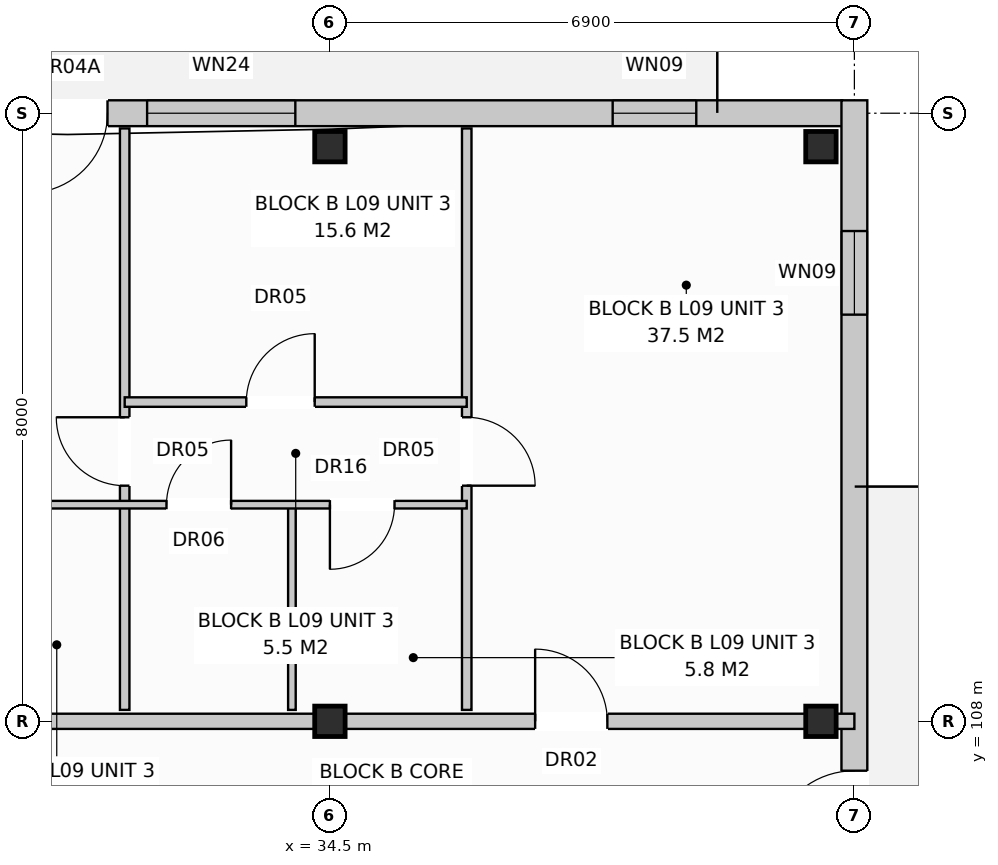
"""IFC4 building model, lengths in metres.
Left out: names, types, materials, properties, quantities, classifications, styles, units other than length and angle.
Written with IfcOpenShell. Run it as: python <this file> out.ifc"""

import sys

from ifc_helpers import new_model, si_unit, direction, frame, frame_2d, origin, origin_with_axes, origin_2d, place, context, subcontext, project, spatial, rectangle, extrude, element, fill, save


model = new_model("IFC4")
c1 = context("Model", 3, precision=1e-05, world=origin(), true_north=direction((0.0, 1.0)))
c2 = subcontext(c1, "Body", "Model", "MODEL_VIEW")
j1 = project(units=[si_unit("LENGTHUNIT", "METRE"), si_unit("PLANEANGLEUNIT", "RADIAN")], contexts=[c1])
p1 = place(None, origin())
s1 = spatial("IfcSite", under=j1, at=p1, CompositionType="ELEMENT")
p2 = place(p1, origin())
s2 = spatial("IfcBuilding", under=s1, at=p2, CompositionType="ELEMENT")
p3 = place(p2, frame((0.0, 0.0, 30.4)))
s3 = spatial("IfcBuildingStorey", under=s2, at=p3, CompositionType="ELEMENT", Elevation=30.4)
for number, where, z_axis, x_axis in (
    (1, (34.5, 108.0, 0.0), (0.0, 0.0, 1.0), (1.0, 0.0, 0.0)),
    (2, (34.5, 115.56, 0.0), (0.0, 0.0, 1.0), (1.0, 0.0, 0.0)),
    (3, (40.96, 108.0, 0.0), (0.0, 0.0, 1.0), (1.0, 0.0, 0.0)),
    (4, (40.96, 115.56, 0.0), (0.0, 0.0, 1.0), (1.0, 0.0, 0.0)),
):
    element("IfcColumn", number, at=place(p3, frame(where, z_axis=z_axis, x_axis=x_axis)), inside=s3, PredefinedType="COLUMN", context=c2, shape_type="SweptSolid", body=[
        extrude(rectangle(XDim=0.4, YDim=0.4, at=origin_2d()), origin(), (0.0, 0.0, 1.0), 3.2),
    ])
p4 = place(p3, frame((0.16, 116.0, 0.0), z_axis=(0.0, 0.0, 1.0), x_axis=(1.0, 0.0, 0.0)))
e5 = element("IfcWall", 5, at=p4, inside=s3, PredefinedType="STANDARD", context=c2, shape_type="SweptSolid", body=[
    extrude(rectangle(XDim=41.08, YDim=0.34, at=frame_2d((20.54, 0.0))), origin(), (0.0, 0.0, 1.0), 2.96),
])
p5 = place(p4, frame((4.864, 0.0, 0.0)))
e6 = element("IfcOpeningElement", 6, at=p5, cuts=e5, PredefinedType="OPENING", context=c2, shape_type="SweptSolid", body=[
    extrude(rectangle(XDim=1.05, YDim=2.12, at=frame_2d((0.525, 1.06))), frame((0.0, 0.182, 0.0), z_axis=(0.0, -1.0, 0.0), x_axis=(1.0, 0.0, 0.0)), (0.0, 0.0, 1.0), 0.364),
])
p6 = place(p4, frame((18.86, 0.0, 0.0)))
e7 = element("IfcOpeningElement", 7, at=p6, cuts=e5, PredefinedType="OPENING", context=c2, shape_type="SweptSolid", body=[
    extrude(rectangle(XDim=1.05, YDim=2.12, at=frame_2d((0.525, 1.06))), frame((0.0, 0.182, 0.0), z_axis=(0.0, -1.0, 0.0), x_axis=(1.0, 0.0, 0.0)), (0.0, 0.0, 1.0), 0.364),
])
p7 = place(p4, frame((30.364, 0.0, 0.0)))
e8 = element("IfcOpeningElement", 8, at=p7, cuts=e5, PredefinedType="OPENING", context=c2, shape_type="SweptSolid", body=[
    extrude(rectangle(XDim=1.05, YDim=2.12, at=frame_2d((0.525, 1.06))), frame((0.0, 0.182, 0.0), z_axis=(0.0, -1.0, 0.0), x_axis=(1.0, 0.0, 0.0)), (0.0, 0.0, 1.0), 0.364),
])
p8 = place(p4, frame((2.46, 0.0, 0.72)))
e9 = element("IfcOpeningElement", 9, at=p8, cuts=e5, PredefinedType="OPENING", context=c2, shape_type="SweptSolid", body=[
    extrude(rectangle(XDim=1.1, YDim=1.5, at=frame_2d((0.55, 0.75))), frame((0.0, 0.182, 0.0), z_axis=(0.0, -1.0, 0.0), x_axis=(1.0, 0.0, 0.0)), (0.0, 0.0, 1.0), 0.364),
])
p9 = place(p4, frame((7.735, 0.0, 0.8)))
e10 = element("IfcOpeningElement", 10, at=p9, cuts=e5, PredefinedType="OPENING", context=c2, shape_type="SweptSolid", body=[
    extrude(rectangle(XDim=1.95, YDim=1.65, at=frame_2d((0.975, 0.825))), frame((0.0, 0.182, 0.0), z_axis=(0.0, -1.0, 0.0), x_axis=(1.0, 0.0, 0.0)), (0.0, 0.0, 1.0), 0.364),
])
p10 = place(p4, frame((14.56, 0.0, 0.72)))
e11 = element("IfcOpeningElement", 11, at=p10, cuts=e5, PredefinedType="OPENING", context=c2, shape_type="SweptSolid", body=[
    extrude(rectangle(XDim=1.1, YDim=1.5, at=frame_2d((0.55, 0.75))), frame((0.0, 0.182, 0.0), z_axis=(0.0, -1.0, 0.0), x_axis=(1.0, 0.0, 0.0)), (0.0, 0.0, 1.0), 0.364),
])
p11 = place(p4, frame((16.81, 0.0, 0.8)))
e12 = element("IfcOpeningElement", 12, at=p11, cuts=e5, PredefinedType="OPENING", context=c2, shape_type="SweptSolid", body=[
    extrude(rectangle(XDim=1.8, YDim=1.7, at=frame_2d((0.9, 0.85))), frame((0.0, 0.182, 0.0), z_axis=(0.0, -1.0, 0.0), x_axis=(1.0, 0.0, 0.0)), (0.0, 0.0, 1.0), 0.364),
])
p12 = place(p4, frame((21.535, 0.0, 0.8)))
e13 = element("IfcOpeningElement", 13, at=p12, cuts=e5, PredefinedType="OPENING", context=c2, shape_type="SweptSolid", body=[
    extrude(rectangle(XDim=1.95, YDim=1.65, at=frame_2d((0.975, 0.825))), frame((0.0, 0.182, 0.0), z_axis=(0.0, -1.0, 0.0), x_axis=(1.0, 0.0, 0.0)), (0.0, 0.0, 1.0), 0.364),
])
p13 = place(p4, frame((25.36, 0.0, 0.72)))
e14 = element("IfcOpeningElement", 14, at=p13, cuts=e5, PredefinedType="OPENING", context=c2, shape_type="SweptSolid", body=[
    extrude(rectangle(XDim=1.1, YDim=1.5, at=frame_2d((0.55, 0.75))), frame((0.0, 0.182, 0.0), z_axis=(0.0, -1.0, 0.0), x_axis=(1.0, 0.0, 0.0)), (0.0, 0.0, 1.0), 0.364),
])
p14 = place(p4, frame((28.66, 0.0, 0.72)))
e15 = element("IfcOpeningElement", 15, at=p14, cuts=e5, PredefinedType="OPENING", context=c2, shape_type="SweptSolid", body=[
    extrude(rectangle(XDim=1.1, YDim=1.5, at=frame_2d((0.55, 0.75))), frame((0.0, 0.182, 0.0), z_axis=(0.0, -1.0, 0.0), x_axis=(1.0, 0.0, 0.0)), (0.0, 0.0, 1.0), 0.364),
])
p15 = place(p4, frame((31.935, 0.0, 0.8)))
e16 = element("IfcOpeningElement", 16, at=p15, cuts=e5, PredefinedType="OPENING", context=c2, shape_type="SweptSolid", body=[
    extrude(rectangle(XDim=1.95, YDim=1.65, at=frame_2d((0.975, 0.825))), frame((0.0, 0.182, 0.0), z_axis=(0.0, -1.0, 0.0), x_axis=(1.0, 0.0, 0.0)), (0.0, 0.0, 1.0), 0.364),
])
p16 = place(p4, frame((38.06, 0.0, 0.72)))
e17 = element("IfcOpeningElement", 17, at=p16, cuts=e5, PredefinedType="OPENING", context=c2, shape_type="SweptSolid", body=[
    extrude(rectangle(XDim=1.1, YDim=1.5, at=frame_2d((0.55, 0.75))), frame((0.0, 0.182, 0.0), z_axis=(0.0, -1.0, 0.0), x_axis=(1.0, 0.0, 0.0)), (0.0, 0.0, 1.0), 0.364),
])
p17 = place(p3, frame((41.4, 97.43, 0.0), z_axis=(0.0, 0.0, 1.0), x_axis=(0.0, 1.0, 0.0)))
e18 = element("IfcWall", 18, at=p17, inside=s3, PredefinedType="STANDARD", context=c2, shape_type="SweptSolid", body=[
    extrude(rectangle(XDim=18.74, YDim=0.34, at=frame_2d((9.37, 0.0))), origin(), (0.0, 0.0, 1.0), 2.96),
])
p18 = place(p17, frame((8.82, 0.0, 0.0)))
e19 = element("IfcOpeningElement", 19, at=p18, cuts=e18, PredefinedType="OPENING", context=c2, shape_type="SweptSolid", body=[
    extrude(rectangle(XDim=1.1, YDim=2.1, at=frame_2d((0.55, 1.05))), frame((0.0, 0.182, 0.0), z_axis=(0.0, -1.0, 0.0), x_axis=(1.0, 0.0, 0.0)), (0.0, 0.0, 1.0), 0.364),
])
p19 = place(p17, frame((1.72, 0.0, 0.72)))
e20 = element("IfcOpeningElement", 20, at=p19, cuts=e18, PredefinedType="OPENING", context=c2, shape_type="SweptSolid", body=[
    extrude(rectangle(XDim=1.1, YDim=1.5, at=frame_2d((0.55, 0.75))), frame((0.0, 0.182, 0.0), z_axis=(0.0, -1.0, 0.0), x_axis=(1.0, 0.0, 0.0)), (0.0, 0.0, 1.0), 0.364),
])
p20 = place(p17, frame((15.92, 0.0, 0.72)))
e21 = element("IfcOpeningElement", 21, at=p20, cuts=e18, PredefinedType="OPENING", context=c2, shape_type="SweptSolid", body=[
    extrude(rectangle(XDim=1.1, YDim=1.5, at=frame_2d((0.55, 0.75))), frame((0.0, 0.182, 0.0), z_axis=(0.0, -1.0, 0.0), x_axis=(1.0, 0.0, 0.0)), (0.0, 0.0, 1.0), 0.364),
])
p21 = place(p3, frame((27.6, 108.0, 0.0), z_axis=(0.0, 0.0, 1.0), x_axis=(1.0, 0.0, 0.0)))
e22 = element("IfcWall", 22, at=p21, inside=s3, PredefinedType="PARTITIONING", context=c2, shape_type="SweptSolid", body=[
    extrude(rectangle(XDim=13.8, YDim=0.2, at=frame_2d((6.9, 0.0))), origin(), (0.0, 0.0, 1.0), 2.4),
])
p22 = place(p21, frame((9.6, 0.0, 0.0)))
e23 = element("IfcOpeningElement", 23, at=p22, cuts=e22, PredefinedType="OPENING", context=c2, shape_type="SweptSolid", body=[
    extrude(rectangle(XDim=0.95, YDim=2.15, at=frame_2d((0.475, 1.075))), frame((0.0, 0.112, 0.0), z_axis=(0.0, -1.0, 0.0), x_axis=(1.0, 0.0, 0.0)), (0.0, 0.0, 1.0), 0.224),
])
p23 = place(p3, frame((36.3, 108.15, 0.0), z_axis=(0.0, 0.0, 1.0), x_axis=(0.0, 1.0, 0.0)))
e24 = element("IfcWall", 24, at=p23, inside=s3, PredefinedType="PARTITIONING", context=c2, shape_type="SweptSolid", body=[
    extrude(rectangle(XDim=7.65, YDim=0.125, at=frame_2d((3.825, 0.0))), origin(), (0.0, 0.0, 1.0), 2.96),
])
p24 = place(p23, frame((2.95, 0.0, 0.0)))
e25 = element("IfcOpeningElement", 25, at=p24, cuts=e24, PredefinedType="OPENING", context=c2, shape_type="SweptSolid", body=[
    extrude(rectangle(XDim=0.9, YDim=2.1, at=frame_2d((0.45, 1.05))), frame((0.0, 0.074, 0.0), z_axis=(0.0, -1.0, 0.0), x_axis=(1.0, 0.0, 0.0)), (0.0, 0.0, 1.0), 0.149),
])
p25 = place(p3, frame((31.8, 108.15, 0.0), z_axis=(0.0, 0.0, 1.0), x_axis=(0.0, 1.0, 0.0)))
e26 = element("IfcWall", 26, at=p25, inside=s3, PredefinedType="PARTITIONING", context=c2, shape_type="SweptSolid", body=[
    extrude(rectangle(XDim=7.65, YDim=0.125, at=frame_2d((3.825, 0.0))), origin(), (0.0, 0.0, 1.0), 2.96),
])
p26 = place(p25, frame((2.95, 0.0, 0.0)))
e27 = element("IfcOpeningElement", 27, at=p26, cuts=e26, PredefinedType="OPENING", context=c2, shape_type="SweptSolid", body=[
    extrude(rectangle(XDim=0.9, YDim=2.1, at=frame_2d((0.45, 1.05))), frame((0.0, 0.074, 0.0), z_axis=(0.0, -1.0, 0.0), x_axis=(1.0, 0.0, 0.0)), (0.0, 0.0, 1.0), 0.149),
])
p27 = place(p3, frame((34.0, 108.15, 0.0), z_axis=(0.0, 0.0, 1.0), x_axis=(0.0, 1.0, 0.0)))
e28 = element("IfcWall", 28, at=p27, inside=s3, PredefinedType="PARTITIONING", context=c2, shape_type="SweptSolid", body=[
    extrude(rectangle(XDim=2.7, YDim=0.1, at=frame_2d((1.35, 0.0))), origin(), (0.0, 0.0, 1.0), 2.96),
])
p28 = place(p3, frame((27.7, 110.85, 0.0), z_axis=(0.0, 0.0, 1.0), x_axis=(1.0, 0.0, 0.0)))
e29 = element("IfcWall", 29, at=p28, inside=s3, PredefinedType="PARTITIONING", context=c2, shape_type="SweptSolid", body=[
    extrude(rectangle(XDim=8.6, YDim=0.1, at=frame_2d((4.3, 0.0))), origin(), (0.0, 0.0, 1.0), 2.96),
])
p29 = place(p28, frame((1.4, 0.0, 0.0)))
e30 = element("IfcOpeningElement", 30, at=p29, cuts=e29, PredefinedType="OPENING", context=c2, shape_type="SweptSolid", body=[
    extrude(rectangle(XDim=0.85, YDim=2.05, at=frame_2d((0.425, 1.025))), frame((0.0, 0.062, 0.0), z_axis=(0.0, -1.0, 0.0), x_axis=(1.0, 0.0, 0.0)), (0.0, 0.0, 1.0), 0.124),
])
p30 = place(p28, frame((4.65, 0.0, 0.0)))
e31 = element("IfcOpeningElement", 31, at=p30, cuts=e29, PredefinedType="OPENING", context=c2, shape_type="SweptSolid", body=[
    extrude(rectangle(XDim=0.85, YDim=2.05, at=frame_2d((0.425, 1.025))), frame((0.0, 0.062, 0.0), z_axis=(0.0, -1.0, 0.0), x_axis=(1.0, 0.0, 0.0)), (0.0, 0.0, 1.0), 0.124),
])
p31 = place(p28, frame((6.8, 0.0, 0.0)))
e32 = element("IfcOpeningElement", 32, at=p31, cuts=e29, PredefinedType="OPENING", context=c2, shape_type="SweptSolid", body=[
    extrude(rectangle(XDim=0.85, YDim=2.1, at=frame_2d((0.425, 1.05))), frame((0.0, 0.062, 0.0), z_axis=(0.0, -1.0, 0.0), x_axis=(1.0, 0.0, 0.0)), (0.0, 0.0, 1.0), 0.124),
])
p32 = place(p3, frame((31.8, 112.2, 0.0), z_axis=(0.0, 0.0, 1.0), x_axis=(1.0, 0.0, 0.0)))
e33 = element("IfcWall", 33, at=p32, inside=s3, PredefinedType="PARTITIONING", context=c2, shape_type="SweptSolid", body=[
    extrude(rectangle(XDim=4.5, YDim=0.125, at=frame_2d((2.25, 0.0))), origin(), (0.0, 0.0, 1.0), 2.96),
])
p33 = place(p32, frame((1.6, 0.0, 0.0)))
e34 = element("IfcOpeningElement", 34, at=p33, cuts=e33, PredefinedType="OPENING", context=c2, shape_type="SweptSolid", body=[
    extrude(rectangle(XDim=0.9, YDim=2.1, at=frame_2d((0.45, 1.05))), frame((0.0, 0.074, 0.0), z_axis=(0.0, -1.0, 0.0), x_axis=(1.0, 0.0, 0.0)), (0.0, 0.0, 1.0), 0.149),
])
p34 = place(p7, frame((1.05, 0.0, 0.0), z_axis=(0.0, 0.0, 1.0), x_axis=(-1.0, 0.0, 0.0)))
e35 = element("IfcDoor", 35, at=p34, inside=s3, OperationType="SINGLE_SWING_LEFT", PredefinedType="DOOR", context=c2, shape_type="SweptSolid", body=[
    extrude(rectangle(XDim=1.05, YDim=2.12, at=frame_2d((0.525, 1.06))), frame((0.0, 0.025, 0.0), z_axis=(0.0, -1.0, 0.0), x_axis=(1.0, 0.0, 0.0)), (0.0, 0.0, 1.0), 0.05),
])
fill(e8, e35)
p35 = place(p15, origin_with_axes())
e36 = element("IfcWindow", 36, at=p35, inside=s3, PartitioningType="SINGLE_PANEL", PredefinedType="WINDOW", context=c2, shape_type="SweptSolid", body=[
    extrude(rectangle(XDim=1.95, YDim=1.65, at=frame_2d((0.975, 0.825))), frame((0.0, 0.03, 0.0), z_axis=(0.0, -1.0, 0.0), x_axis=(1.0, 0.0, 0.0)), (0.0, 0.0, 1.0), 0.06),
])
fill(e16, e36)
p36 = place(p16, origin_with_axes())
e37 = element("IfcWindow", 37, at=p36, inside=s3, PartitioningType="SINGLE_PANEL", PredefinedType="WINDOW", context=c2, shape_type="SweptSolid", body=[
    extrude(rectangle(XDim=1.1, YDim=1.5, at=frame_2d((0.55, 0.75))), frame((0.0, 0.03, 0.0), z_axis=(0.0, -1.0, 0.0), x_axis=(1.0, 0.0, 0.0)), (0.0, 0.0, 1.0), 0.06),
])
fill(e17, e37)
p37 = place(p18, origin_with_axes())
e38 = element("IfcDoor", 38, at=p37, inside=s3, OperationType="SINGLE_SWING_LEFT", PredefinedType="DOOR", context=c2, shape_type="SweptSolid", body=[
    extrude(rectangle(XDim=1.1, YDim=2.1, at=frame_2d((0.55, 1.05))), frame((0.0, 0.025, 0.0), z_axis=(0.0, -1.0, 0.0), x_axis=(1.0, 0.0, 0.0)), (0.0, 0.0, 1.0), 0.05),
])
fill(e19, e38)
p38 = place(p20, origin_with_axes())
e39 = element("IfcWindow", 39, at=p38, inside=s3, PartitioningType="SINGLE_PANEL", PredefinedType="WINDOW", context=c2, shape_type="SweptSolid", body=[
    extrude(rectangle(XDim=1.1, YDim=1.5, at=frame_2d((0.55, 0.75))), frame((0.0, 0.03, 0.0), z_axis=(0.0, -1.0, 0.0), x_axis=(1.0, 0.0, 0.0)), (0.0, 0.0, 1.0), 0.06),
])
fill(e21, e39)
p39 = place(p22, origin_with_axes())
e40 = element("IfcDoor", 40, at=p39, inside=s3, OperationType="SINGLE_SWING_LEFT", PredefinedType="DOOR", context=c2, shape_type="SweptSolid", body=[
    extrude(rectangle(XDim=0.95, YDim=2.15, at=frame_2d((0.475, 1.075))), frame((0.0, 0.025, 0.0), z_axis=(0.0, -1.0, 0.0), x_axis=(1.0, 0.0, 0.0)), (0.0, 0.0, 1.0), 0.05),
])
fill(e23, e40)
p40 = place(p24, frame((0.9, 0.0, 0.0), z_axis=(0.0, 0.0, 1.0), x_axis=(-1.0, 0.0, 0.0)))
e41 = element("IfcDoor", 41, at=p40, inside=s3, OperationType="SINGLE_SWING_LEFT", PredefinedType="DOOR", context=c2, shape_type="SweptSolid", body=[
    extrude(rectangle(XDim=0.9, YDim=2.1, at=frame_2d((0.45, 1.05))), frame((0.0, 0.025, 0.0), z_axis=(0.0, -1.0, 0.0), x_axis=(1.0, 0.0, 0.0)), (0.0, 0.0, 1.0), 0.05),
])
fill(e25, e41)
p41 = place(p26, origin_with_axes())
e42 = element("IfcDoor", 42, at=p41, inside=s3, OperationType="SINGLE_SWING_RIGHT", PredefinedType="DOOR", context=c2, shape_type="SweptSolid", body=[
    extrude(rectangle(XDim=0.9, YDim=2.1, at=frame_2d((0.45, 1.05))), frame((0.0, 0.025, 0.0), z_axis=(0.0, -1.0, 0.0), x_axis=(1.0, 0.0, 0.0)), (0.0, 0.0, 1.0), 0.05),
])
fill(e27, e42)
p42 = place(p30, origin_with_axes())
e43 = element("IfcDoor", 43, at=p42, inside=s3, OperationType="SINGLE_SWING_RIGHT", PredefinedType="DOOR", context=c2, shape_type="SweptSolid", body=[
    extrude(rectangle(XDim=0.85, YDim=2.05, at=frame_2d((0.425, 1.025))), frame((0.0, 0.025, 0.0), z_axis=(0.0, -1.0, 0.0), x_axis=(1.0, 0.0, 0.0)), (0.0, 0.0, 1.0), 0.05),
])
fill(e31, e43)
p43 = place(p31, frame((0.85, 0.0, 0.0), z_axis=(0.0, 0.0, 1.0), x_axis=(-1.0, 0.0, 0.0)))
e44 = element("IfcDoor", 44, at=p43, inside=s3, OperationType="SINGLE_SWING_LEFT", PredefinedType="DOOR", context=c2, shape_type="SweptSolid", body=[
    extrude(rectangle(XDim=0.85, YDim=2.1, at=frame_2d((0.425, 1.05))), frame((0.0, 0.025, 0.0), z_axis=(0.0, -1.0, 0.0), x_axis=(1.0, 0.0, 0.0)), (0.0, 0.0, 1.0), 0.05),
])
fill(e32, e44)
p44 = place(p33, origin_with_axes())
e45 = element("IfcDoor", 45, at=p44, inside=s3, OperationType="SINGLE_SWING_RIGHT", PredefinedType="DOOR", context=c2, shape_type="SweptSolid", body=[
    extrude(rectangle(XDim=0.9, YDim=2.1, at=frame_2d((0.45, 1.05))), frame((0.0, 0.025, 0.0), z_axis=(0.0, -1.0, 0.0), x_axis=(1.0, 0.0, 0.0)), (0.0, 0.0, 1.0), 0.05),
])
fill(e34, e45)
save(model, sys.argv[1])
